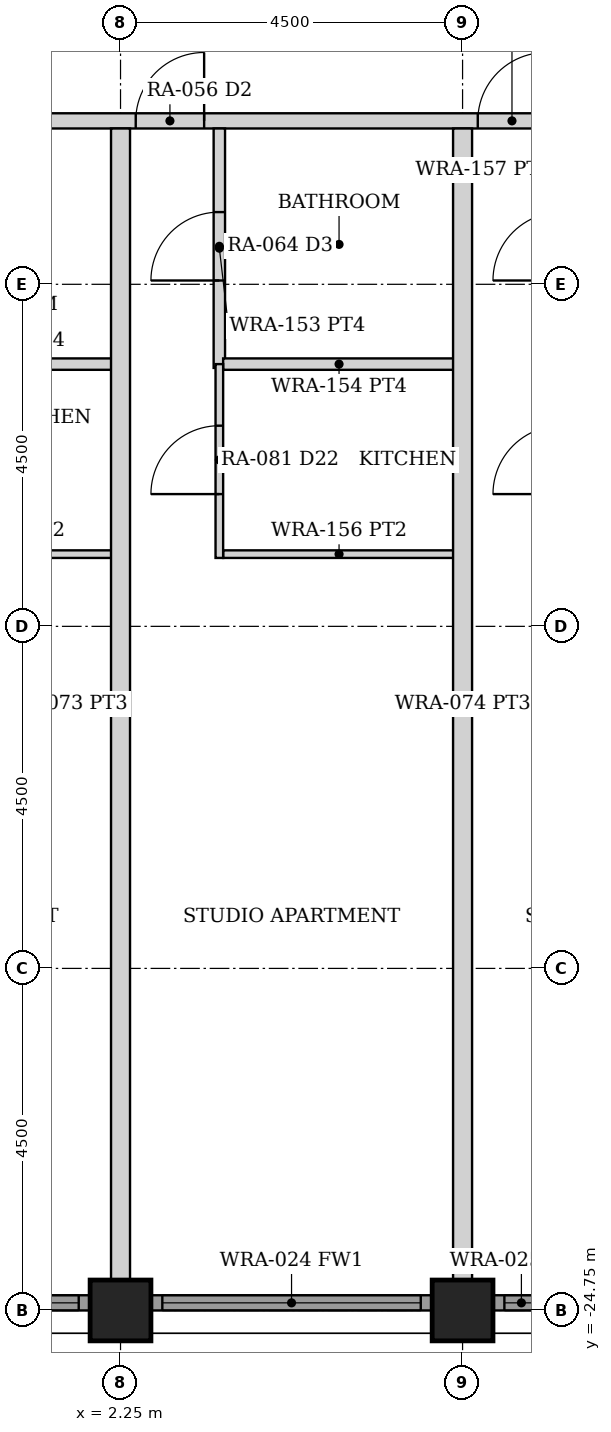
"""IFC4 building model, lengths in metres.
Left out: names, types, materials, properties, quantities, classifications, styles, units other than length and angle.
Written with IfcOpenShell. Run it as: python <this file> out.ifc"""

import sys

from ifc_helpers import new_model, si_unit, direction, frame, frame_2d, origin, origin_2d, place, context, subcontext, project, spatial, rectangle, hollow_rectangle, extrude, element, fill, save


model = new_model("IFC4")
c1 = context("Model", 3, precision=1e-05, world=origin(), true_north=direction((0.0, 1.0)))
c2 = subcontext(c1, "Body", "Model", "MODEL_VIEW")
j1 = project(units=[si_unit("LENGTHUNIT", "METRE"), si_unit("PLANEANGLEUNIT", "RADIAN")], contexts=[c1])
p1 = place(None, origin())
s1 = spatial("IfcSite", under=j1, at=p1, CompositionType="ELEMENT")
p2 = place(p1, origin())
s2 = spatial("IfcBuilding", under=s1, at=p2, CompositionType="ELEMENT")
p3 = place(p2, frame((0.0, 0.0, 26.5)))
s3 = spatial("IfcBuildingStorey", under=s2, at=p3, CompositionType="ELEMENT", Elevation=26.5)
for number, where, z_axis, x_axis in (
    (1, (2.25, -24.75, 0.0), (0.0, 0.0, 1.0), (0.0, 1.0, 0.0)),
    (2, (6.75, -24.75, 0.0), (0.0, 0.0, 1.0), (0.0, 1.0, 0.0)),
):
    element("IfcColumn", number, at=place(p3, frame(where, z_axis=z_axis, x_axis=x_axis)), inside=s3, PredefinedType="COLUMN", context=c2, shape_type="SweptSolid", body=[
        extrude(hollow_rectangle(XDim=0.8, YDim=0.8, WallThickness=0.08, at=origin_2d()), origin(), (0.0, 0.0, 1.0), 3.5),
    ])
p4 = place(p3, frame((-1.845, -24.65, 0.0), z_axis=(0.0, 0.0, 1.0), x_axis=(1.0, 0.0, 0.0)))
e3 = element("IfcWall", 3, at=p4, inside=s3, PredefinedType="SOLIDWALL", context=c2, shape_type="SweptSolid", body=[
    extrude(rectangle(XDim=3.69, YDim=0.2, at=frame_2d((1.845, 0.0))), origin(), (0.0, 0.0, 1.0), 2.379),
])
p5 = place(p4, frame((0.145, 0.0, 0.3)))
e4 = element("IfcOpeningElement", 4, at=p5, cuts=e3, PredefinedType="OPENING", context=c2, shape_type="SweptSolid", body=[
    extrude(rectangle(XDim=3.4, YDim=1.929, at=frame_2d((1.7, 0.964))), frame((0.0, 0.11, 0.0), z_axis=(0.0, -1.0, 0.0), x_axis=(1.0, 0.0, 0.0)), (0.0, 0.0, 1.0), 0.22),
])
p6 = place(p3, frame((2.655, -24.65, 0.0), z_axis=(0.0, 0.0, 1.0), x_axis=(1.0, 0.0, 0.0)))
e5 = element("IfcWall", 5, at=p6, inside=s3, PredefinedType="SOLIDWALL", context=c2, shape_type="SweptSolid", body=[
    extrude(rectangle(XDim=3.69, YDim=0.2, at=frame_2d((1.845, 0.0))), origin(), (0.0, 0.0, 1.0), 2.379),
])
p7 = place(p6, frame((0.145, 0.0, 0.3)))
e6 = element("IfcOpeningElement", 6, at=p7, cuts=e5, PredefinedType="OPENING", context=c2, shape_type="SweptSolid", body=[
    extrude(rectangle(XDim=3.4, YDim=1.929, at=frame_2d((1.7, 0.964))), frame((0.0, 0.11, 0.0), z_axis=(0.0, -1.0, 0.0), x_axis=(1.0, 0.0, 0.0)), (0.0, 0.0, 1.0), 0.22),
])
p8 = place(p3, frame((7.155, -24.65, 0.0), z_axis=(0.0, 0.0, 1.0), x_axis=(1.0, 0.0, 0.0)))
e7 = element("IfcWall", 7, at=p8, inside=s3, PredefinedType="SOLIDWALL", context=c2, shape_type="SweptSolid", body=[
    extrude(rectangle(XDim=3.69, YDim=0.2, at=frame_2d((1.845, 0.0))), origin(), (0.0, 0.0, 1.0), 2.379),
])
p9 = place(p8, frame((0.145, 0.0, 0.3)))
e8 = element("IfcOpeningElement", 8, at=p9, cuts=e7, PredefinedType="OPENING", context=c2, shape_type="SweptSolid", body=[
    extrude(rectangle(XDim=3.4, YDim=1.929, at=frame_2d((1.7, 0.964))), frame((0.0, 0.11, 0.0), z_axis=(0.0, -1.0, 0.0), x_axis=(1.0, 0.0, 0.0)), (0.0, 0.0, 1.0), 0.22),
])
p10 = place(p3, frame((-24.55, -9.1, 0.0), z_axis=(0.0, 0.0, 1.0), x_axis=(1.0, 0.0, 0.0)))
e9 = element("IfcWall", 9, at=p10, inside=s3, PredefinedType="PARTITIONING", context=c2, shape_type="SweptSolid", body=[
    extrude(rectangle(XDim=49.1, YDim=0.2, at=frame_2d((24.55, 0.0))), origin(), (0.0, 0.0, 1.0), 2.373),
])
p11 = place(p10, frame((5.1, 0.0, 0.0)))
e10 = element("IfcOpeningElement", 10, at=p11, cuts=e9, PredefinedType="OPENING", context=c2, shape_type="SweptSolid", body=[
    extrude(rectangle(XDim=0.9, YDim=2.1, at=frame_2d((0.45, 1.05))), frame((0.0, 0.11, 0.0), z_axis=(0.0, -1.0, 0.0), x_axis=(1.0, 0.0, 0.0)), (0.0, 0.0, 1.0), 0.22),
])
p12 = place(p10, frame((9.0, 0.0, 0.0)))
e11 = element("IfcOpeningElement", 11, at=p12, cuts=e9, PredefinedType="OPENING", context=c2, shape_type="SweptSolid", body=[
    extrude(rectangle(XDim=0.9, YDim=2.1, at=frame_2d((0.45, 1.05))), frame((0.0, 0.11, 0.0), z_axis=(0.0, -1.0, 0.0), x_axis=(1.0, 0.0, 0.0)), (0.0, 0.0, 1.0), 0.22),
])
p13 = place(p10, frame((13.5, 0.0, 0.0)))
e12 = element("IfcOpeningElement", 12, at=p13, cuts=e9, PredefinedType="OPENING", context=c2, shape_type="SweptSolid", body=[
    extrude(rectangle(XDim=0.9, YDim=2.1, at=frame_2d((0.45, 1.05))), frame((0.0, 0.11, 0.0), z_axis=(0.0, -1.0, 0.0), x_axis=(1.0, 0.0, 0.0)), (0.0, 0.0, 1.0), 0.22),
])
p14 = place(p10, frame((18.0, 0.0, 0.0)))
e13 = element("IfcOpeningElement", 13, at=p14, cuts=e9, PredefinedType="OPENING", context=c2, shape_type="SweptSolid", body=[
    extrude(rectangle(XDim=0.9, YDim=2.1, at=frame_2d((0.45, 1.05))), frame((0.0, 0.11, 0.0), z_axis=(0.0, -1.0, 0.0), x_axis=(1.0, 0.0, 0.0)), (0.0, 0.0, 1.0), 0.22),
])
p15 = place(p10, frame((22.5, 0.0, 0.0)))
e14 = element("IfcOpeningElement", 14, at=p15, cuts=e9, PredefinedType="OPENING", context=c2, shape_type="SweptSolid", body=[
    extrude(rectangle(XDim=0.9, YDim=2.1, at=frame_2d((0.45, 1.05))), frame((0.0, 0.11, 0.0), z_axis=(0.0, -1.0, 0.0), x_axis=(1.0, 0.0, 0.0)), (0.0, 0.0, 1.0), 0.22),
])
p16 = place(p10, frame((27.0, 0.0, 0.0)))
e15 = element("IfcOpeningElement", 15, at=p16, cuts=e9, PredefinedType="OPENING", context=c2, shape_type="SweptSolid", body=[
    extrude(rectangle(XDim=0.9, YDim=2.1, at=frame_2d((0.45, 1.05))), frame((0.0, 0.11, 0.0), z_axis=(0.0, -1.0, 0.0), x_axis=(1.0, 0.0, 0.0)), (0.0, 0.0, 1.0), 0.22),
])
p17 = place(p10, frame((31.5, 0.0, 0.0)))
e16 = element("IfcOpeningElement", 16, at=p17, cuts=e9, PredefinedType="OPENING", context=c2, shape_type="SweptSolid", body=[
    extrude(rectangle(XDim=0.9, YDim=2.1, at=frame_2d((0.45, 1.05))), frame((0.0, 0.11, 0.0), z_axis=(0.0, -1.0, 0.0), x_axis=(1.0, 0.0, 0.0)), (0.0, 0.0, 1.0), 0.22),
])
p18 = place(p10, frame((36.0, 0.0, 0.0)))
e17 = element("IfcOpeningElement", 17, at=p18, cuts=e9, PredefinedType="OPENING", context=c2, shape_type="SweptSolid", body=[
    extrude(rectangle(XDim=0.9, YDim=2.1, at=frame_2d((0.45, 1.05))), frame((0.0, 0.11, 0.0), z_axis=(0.0, -1.0, 0.0), x_axis=(1.0, 0.0, 0.0)), (0.0, 0.0, 1.0), 0.22),
])
p19 = place(p10, frame((43.1, 0.0, 0.0)))
e18 = element("IfcOpeningElement", 18, at=p19, cuts=e9, PredefinedType="OPENING", context=c2, shape_type="SweptSolid", body=[
    extrude(rectangle(XDim=0.9, YDim=2.1, at=frame_2d((0.45, 1.05))), frame((0.0, 0.11, 0.0), z_axis=(0.0, -1.0, 0.0), x_axis=(1.0, 0.0, 0.0)), (0.0, 0.0, 1.0), 0.22),
])
p20 = place(p3, frame((-0.9, -12.3, 0.0), z_axis=(0.0, 0.0, 1.0), x_axis=(1.0, 0.0, 0.0)))
e19 = element("IfcWall", 19, at=p20, inside=s3, PredefinedType="PARTITIONING", context=c2, shape_type="SweptSolid", body=[
    extrude(rectangle(XDim=3.05, YDim=0.15, at=frame_2d((1.525, 0.0))), origin(), (0.0, 0.0, 1.0), 2.373),
])
p21 = place(p3, frame((-0.9, -14.8, 0.0), z_axis=(0.0, 0.0, 1.0), x_axis=(1.0, 0.0, 0.0)))
e20 = element("IfcWall", 20, at=p21, inside=s3, PredefinedType="PARTITIONING", context=c2, shape_type="SweptSolid", body=[
    extrude(rectangle(XDim=3.05, YDim=0.1, at=frame_2d((1.525, 0.0))), origin(), (0.0, 0.0, 1.0), 2.373),
])
p22 = place(p3, frame((3.55, -12.35, 0.0), z_axis=(0.0, 0.0, 1.0), x_axis=(0.0, 1.0, 0.0)))
e21 = element("IfcWall", 21, at=p22, inside=s3, PredefinedType="PARTITIONING", context=c2, shape_type="SweptSolid", body=[
    extrude(rectangle(XDim=3.15, YDim=0.15, at=frame_2d((1.575, 0.0))), origin(), (0.0, 0.0, 1.0), 2.373),
])
p23 = place(p22, frame((1.15, 0.0, 0.0)))
e22 = element("IfcOpeningElement", 22, at=p23, cuts=e21, PredefinedType="OPENING", context=c2, shape_type="SweptSolid", body=[
    extrude(rectangle(XDim=0.9, YDim=2.1, at=frame_2d((0.45, 1.05))), frame((0.0, 0.085, 0.0), z_axis=(0.0, -1.0, 0.0), x_axis=(1.0, 0.0, 0.0)), (0.0, 0.0, 1.0), 0.17),
])
p24 = place(p3, frame((3.6, -12.3, 0.0), z_axis=(0.0, 0.0, 1.0), x_axis=(1.0, 0.0, 0.0)))
e23 = element("IfcWall", 23, at=p24, inside=s3, PredefinedType="PARTITIONING", context=c2, shape_type="SweptSolid", body=[
    extrude(rectangle(XDim=3.05, YDim=0.15, at=frame_2d((1.525, 0.0))), origin(), (0.0, 0.0, 1.0), 2.373),
])
p25 = place(p3, frame((3.6, -14.8, 0.0), z_axis=(0.0, 0.0, 1.0), x_axis=(1.0, 0.0, 0.0)))
e24 = element("IfcWall", 24, at=p25, inside=s3, PredefinedType="PARTITIONING", context=c2, shape_type="SweptSolid", body=[
    extrude(rectangle(XDim=3.05, YDim=0.1, at=frame_2d((1.525, 0.0))), origin(), (0.0, 0.0, 1.0), 2.373),
])
p26 = place(p3, frame((3.55, -14.85, 0.0), z_axis=(0.0, 0.0, 1.0), x_axis=(0.0, 1.0, 0.0)))
e25 = element("IfcWall", 25, at=p26, inside=s3, PredefinedType="PARTITIONING", context=c2, shape_type="SweptSolid", body=[
    extrude(rectangle(XDim=2.55, YDim=0.1, at=frame_2d((1.275, 0.0))), origin(), (0.0, 0.0, 1.0), 2.373),
])
p27 = place(p26, frame((0.84, 0.0, 0.0)))
e26 = element("IfcOpeningElement", 26, at=p27, cuts=e25, PredefinedType="OPENING", context=c2, shape_type="SweptSolid", body=[
    extrude(rectangle(XDim=0.9, YDim=2.1, at=frame_2d((0.45, 1.05))), frame((0.0, 0.06, 0.0), z_axis=(0.0, -1.0, 0.0), x_axis=(1.0, 0.0, 0.0)), (0.0, 0.0, 1.0), 0.12),
])
for number, where, z_axis, x_axis in (
    (27, (2.25, -24.35, 0.0), (0.0, 0.0, 1.0), (0.0, 1.0, 0.0)),
    (28, (6.75, -24.35, 0.0), (0.0, 0.0, 1.0), (0.0, 1.0, 0.0)),
):
    element("IfcWall", number, at=place(p3, frame(where, z_axis=z_axis, x_axis=x_axis)), inside=s3, PredefinedType="PARTITIONING", context=c2, shape_type="SweptSolid", body=[
        extrude(rectangle(XDim=15.15, YDim=0.25, at=frame_2d((7.575, 0.0))), origin(), (0.0, 0.0, 1.0), 2.373),
    ])
p28 = place(p5, origin())
e29 = element("IfcWindow", 29, at=p28, inside=s3, PartitioningType="SINGLE_PANEL", PredefinedType="WINDOW", context=c2, shape_type="SweptSolid", body=[
    extrude(rectangle(XDim=3.4, YDim=1.929, at=frame_2d((1.7, 0.964))), frame((0.0, 0.03, 0.0), z_axis=(0.0, -1.0, 0.0), x_axis=(1.0, 0.0, 0.0)), (0.0, 0.0, 1.0), 0.06),
])
fill(e4, e29)
p29 = place(p7, origin())
e30 = element("IfcWindow", 30, at=p29, inside=s3, PartitioningType="SINGLE_PANEL", PredefinedType="WINDOW", context=c2, shape_type="SweptSolid", body=[
    extrude(rectangle(XDim=3.4, YDim=1.929, at=frame_2d((1.7, 0.964))), frame((0.0, 0.03, 0.0), z_axis=(0.0, -1.0, 0.0), x_axis=(1.0, 0.0, 0.0)), (0.0, 0.0, 1.0), 0.06),
])
fill(e6, e30)
p30 = place(p9, origin())
e31 = element("IfcWindow", 31, at=p30, inside=s3, PartitioningType="SINGLE_PANEL", PredefinedType="WINDOW", context=c2, shape_type="SweptSolid", body=[
    extrude(rectangle(XDim=3.4, YDim=1.929, at=frame_2d((1.7, 0.964))), frame((0.0, 0.03, 0.0), z_axis=(0.0, -1.0, 0.0), x_axis=(1.0, 0.0, 0.0)), (0.0, 0.0, 1.0), 0.06),
])
fill(e8, e31)
p31 = place(p16, origin())
e32 = element("IfcDoor", 32, at=p31, inside=s3, OperationType="SINGLE_SWING_RIGHT", PredefinedType="DOOR", context=c2, shape_type="SweptSolid", body=[
    extrude(rectangle(XDim=0.9, YDim=2.1, at=frame_2d((0.45, 1.05))), frame((0.0, 0.025, 0.0), z_axis=(0.0, -1.0, 0.0), x_axis=(1.0, 0.0, 0.0)), (0.0, 0.0, 1.0), 0.05),
])
fill(e15, e32)
p32 = place(p23, origin())
e33 = element("IfcDoor", 33, at=p32, inside=s3, OperationType="SINGLE_SWING_LEFT", PredefinedType="DOOR", context=c2, shape_type="SweptSolid", body=[
    extrude(rectangle(XDim=0.9, YDim=2.1, at=frame_2d((0.45, 1.05))), frame((0.0, 0.025, 0.0), z_axis=(0.0, -1.0, 0.0), x_axis=(1.0, 0.0, 0.0)), (0.0, 0.0, 1.0), 0.05),
])
fill(e22, e33)
p33 = place(p27, origin())
e34 = element("IfcDoor", 34, at=p33, inside=s3, OperationType="SINGLE_SWING_LEFT", PredefinedType="DOOR", context=c2, shape_type="SweptSolid", body=[
    extrude(rectangle(XDim=0.9, YDim=2.1, at=frame_2d((0.45, 1.05))), frame((0.0, 0.025, 0.0), z_axis=(0.0, -1.0, 0.0), x_axis=(1.0, 0.0, 0.0)), (0.0, 0.0, 1.0), 0.05),
])
fill(e26, e34)
p34 = place(p17, origin())
e35 = element("IfcDoor", 35, at=p34, inside=s3, OperationType="SINGLE_SWING_RIGHT", PredefinedType="DOOR", context=c2, shape_type="SweptSolid", body=[
    extrude(rectangle(XDim=0.9, YDim=2.1, at=frame_2d((0.45, 1.05))), frame((0.0, 0.025, 0.0), z_axis=(0.0, -1.0, 0.0), x_axis=(1.0, 0.0, 0.0)), (0.0, 0.0, 1.0), 0.05),
])
fill(e16, e35)
save(model, sys.argv[1])
